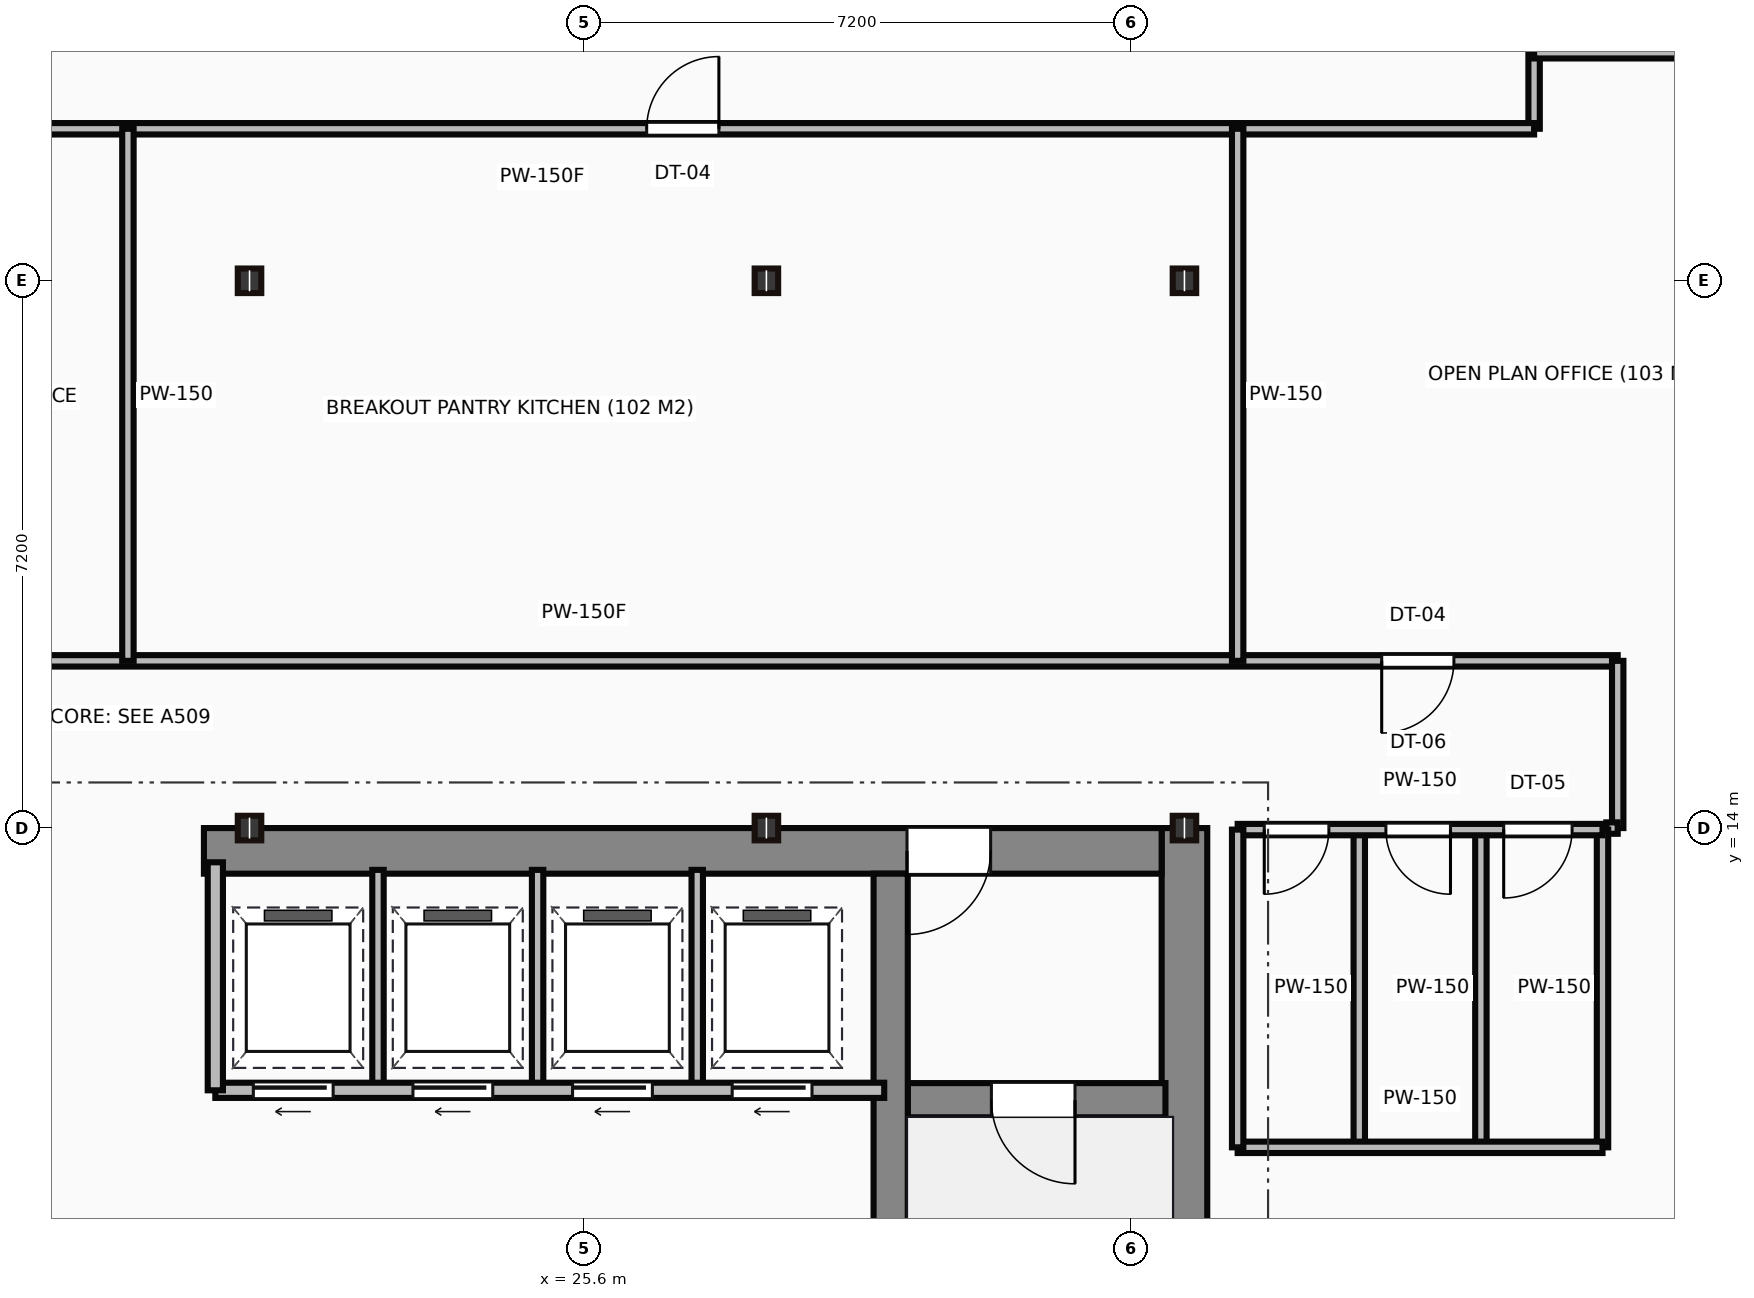
"""IFC4 building model, lengths in metres.
Left out: names, types, materials, properties, quantities, classifications, styles, units other than length and angle.
Written with IfcOpenShell. Run it as: python <this file> out.ifc"""

import sys

from ifc_helpers import new_model, si_unit, direction, frame, frame_2d, origin, origin_2d, place, context, subcontext, project, spatial, rectangle, i_section, extrude, source, transform, mapped, element, fill, save


model = new_model("IFC4")
c1 = context("Model", 3, precision=1e-05, world=origin(), true_north=direction((0.0, 1.0)))
c2 = subcontext(c1, "Body", "Model", "MODEL_VIEW")
j1 = project(units=[si_unit("LENGTHUNIT", "METRE"), si_unit("PLANEANGLEUNIT", "RADIAN")], contexts=[c1])
p1 = place(None, origin())
s1 = spatial("IfcSite", under=j1, at=p1, CompositionType="ELEMENT")
p2 = place(p1, origin())
s2 = spatial("IfcBuilding", under=s1, at=p2, CompositionType="ELEMENT")
p3 = place(p2, frame((0.0, 0.0, 210.5)))
s3 = spatial("IfcBuildingStorey", under=s2, at=p3, CompositionType="ELEMENT", Elevation=210.5)
m1 = source(origin(), c2, "Body", "SweptSolid", [
    extrude(rectangle(XDim=13.1, YDim=0.6, at=frame_2d((6.55, 0.0))), origin(), (0.0, 0.0, 1.0), 3.65),
])
p4 = place(p3, frame((33.5, 0.9, 0.0), z_axis=(0.0, 0.0, 1.0), x_axis=(0.0, 1.0, 0.0)))
e1 = element("IfcWall", 1, at=p4, inside=s3, PredefinedType="SHEAR", context=c2, shape_type="MappedRepresentation", body=[
    mapped(m1, transform((0.0, 0.0, 0.0))),
])
m2 = source(origin(), c2, "Body", "SweptSolid", [
    extrude(rectangle(XDim=12.6, YDim=0.6, at=frame_2d((6.3, 0.0))), origin(), (0.0, 0.0, 1.0), 3.65),
])
p5 = place(p3, frame((20.6, 13.7, 0.0), z_axis=(0.0, 0.0, 1.0), x_axis=(1.0, 0.0, 0.0)))
e2 = element("IfcWall", 2, at=p5, inside=s3, PredefinedType="SHEAR", context=c2, shape_type="MappedRepresentation", body=[
    mapped(m2, transform((0.0, 0.0, 0.0))),
])
p6 = place(p5, frame((9.25, 0.0, 0.0)))
e3 = element("IfcOpeningElement", 3, at=p6, cuts=e2, PredefinedType="OPENING", context=c2, shape_type="SweptSolid", body=[
    extrude(rectangle(XDim=1.1, YDim=2.15, at=frame_2d((0.55, 1.075))), frame((0.0, 0.31, 0.0), z_axis=(0.0, -1.0, 0.0), x_axis=(1.0, 0.0, 0.0)), (0.0, 0.0, 1.0), 0.62),
])
m3 = source(origin(), c2, "Body", "SweptSolid", [
    extrude(rectangle(XDim=12.5, YDim=0.45, at=frame_2d((6.25, 0.0))), origin(), (0.0, 0.0, 1.0), 3.65),
])
p7 = place(p3, frame((29.635, 0.9, 0.0), z_axis=(0.0, 0.0, 1.0), x_axis=(0.0, 1.0, 0.0)))
e4 = element("IfcWall", 4, at=p7, inside=s3, PredefinedType="SHEAR", context=c2, shape_type="MappedRepresentation", body=[
    mapped(m3, transform((0.0, 0.0, 0.0))),
])
m4 = source(origin(), c2, "Body", "SweptSolid", [
    extrude(rectangle(XDim=3.39, YDim=0.45, at=frame_2d((1.695, 0.0))), origin(), (0.0, 0.0, 1.0), 3.65),
])
p8 = place(p3, frame((29.86, 10.42, 0.0), z_axis=(0.0, 0.0, 1.0), x_axis=(1.0, 0.0, 0.0)))
e5 = element("IfcWall", 5, at=p8, inside=s3, PredefinedType="SHEAR", context=c2, shape_type="MappedRepresentation", body=[
    mapped(m4, transform((0.0, 0.0, 0.0))),
])
p9 = place(p8, frame((1.1, 0.0, 0.0)))
e6 = element("IfcOpeningElement", 6, at=p9, cuts=e5, PredefinedType="OPENING", context=c2, shape_type="SweptSolid", body=[
    extrude(rectangle(XDim=1.1, YDim=2.15, at=frame_2d((0.55, 1.075))), frame((0.0, 0.235, 0.0), z_axis=(0.0, -1.0, 0.0), x_axis=(1.0, 0.0, 0.0)), (0.0, 0.0, 1.0), 0.47),
])
m5 = source(origin(), c2, "Body", "SweptSolid", [
    extrude(i_section(OverallWidth=0.309, OverallDepth=0.323, WebThickness=0.014, FlangeThickness=0.023, at=origin_2d()), origin(), (0.0, 0.0, 1.0), 3.65),
])
for number, where, z_axis, x_axis in (
    (7, (21.2, 14.0, 0.0), (0.0, 0.0, 1.0), (1.0, 0.0, 0.0)),
    (8, (21.2, 21.2, 0.0), (0.0, 0.0, 1.0), (1.0, 0.0, 0.0)),
    (9, (28.0, 14.0, 0.0), (0.0, 0.0, 1.0), (1.0, 0.0, 0.0)),
    (10, (28.0, 21.2, 0.0), (0.0, 0.0, 1.0), (1.0, 0.0, 0.0)),
    (11, (33.5, 14.0, 0.0), (0.0, 0.0, 1.0), (1.0, 0.0, 0.0)),
    (12, (33.5, 21.2, 0.0), (0.0, 0.0, 1.0), (1.0, 0.0, 0.0)),
):
    element("IfcColumn", number, at=place(p3, frame(where, z_axis=z_axis, x_axis=x_axis)), inside=s3, PredefinedType="COLUMN", context=c2, shape_type="MappedRepresentation", body=[
        mapped(m5, transform((0.0, 0.0, 0.0))),
    ])
m6 = source(origin(), c2, "Body", "SweptSolid", [
    extrude(rectangle(XDim=8.8, YDim=0.2, at=frame_2d((4.4, 0.0))), origin(), (0.0, 0.0, 1.0), 3.4),
])
p10 = place(p3, frame((20.75, 10.55, 0.0), z_axis=(0.0, 0.0, 1.0), x_axis=(1.0, 0.0, 0.0)))
e13 = element("IfcWall", 13, at=p10, inside=s3, PredefinedType="PARTITIONING", context=c2, shape_type="MappedRepresentation", body=[
    mapped(m6, transform((0.0, 0.0, 0.0))),
])
p11 = place(p10, frame((0.5, 0.0, 0.0)))
e14 = element("IfcOpeningElement", 14, at=p11, cuts=e13, PredefinedType="OPENING", context=c2, shape_type="SweptSolid", body=[
    extrude(rectangle(XDim=1.05, YDim=2.15, at=frame_2d((0.525, 1.075))), frame((0.0, 0.11, 0.0), z_axis=(0.0, -1.0, 0.0), x_axis=(1.0, 0.0, 0.0)), (0.0, 0.0, 1.0), 0.22),
])
p12 = place(p10, frame((2.6, 0.0, 0.0)))
e15 = element("IfcOpeningElement", 15, at=p12, cuts=e13, PredefinedType="OPENING", context=c2, shape_type="SweptSolid", body=[
    extrude(rectangle(XDim=1.05, YDim=2.15, at=frame_2d((0.525, 1.075))), frame((0.0, 0.11, 0.0), z_axis=(0.0, -1.0, 0.0), x_axis=(1.0, 0.0, 0.0)), (0.0, 0.0, 1.0), 0.22),
])
p13 = place(p10, frame((4.7, 0.0, 0.0)))
e16 = element("IfcOpeningElement", 16, at=p13, cuts=e13, PredefinedType="OPENING", context=c2, shape_type="SweptSolid", body=[
    extrude(rectangle(XDim=1.05, YDim=2.15, at=frame_2d((0.525, 1.075))), frame((0.0, 0.11, 0.0), z_axis=(0.0, -1.0, 0.0), x_axis=(1.0, 0.0, 0.0)), (0.0, 0.0, 1.0), 0.22),
])
p14 = place(p10, frame((6.8, 0.0, 0.0)))
e17 = element("IfcOpeningElement", 17, at=p14, cuts=e13, PredefinedType="OPENING", context=c2, shape_type="SweptSolid", body=[
    extrude(rectangle(XDim=1.05, YDim=2.15, at=frame_2d((0.525, 1.075))), frame((0.0, 0.11, 0.0), z_axis=(0.0, -1.0, 0.0), x_axis=(1.0, 0.0, 0.0)), (0.0, 0.0, 1.0), 0.22),
])
m7 = source(origin(), c2, "Body", "SweptSolid", [
    extrude(rectangle(XDim=3.0, YDim=0.2, at=frame_2d((1.5, 0.0))), origin(), (0.0, 0.0, 1.0), 3.4),
])
p15 = place(p3, frame((20.75, 10.55, 0.0), z_axis=(0.0, 0.0, 1.0), x_axis=(0.0, 1.0, 0.0)))
e18 = element("IfcWall", 18, at=p15, inside=s3, PredefinedType="PARTITIONING", context=c2, shape_type="MappedRepresentation", body=[
    mapped(m7, transform((0.0, 0.0, 0.0))),
])
m8 = source(origin(), c2, "Body", "SweptSolid", [
    extrude(rectangle(XDim=2.85, YDim=0.15, at=frame_2d((1.425, 0.0))), origin(), (0.0, 0.0, 1.0), 3.4),
])
for number, where, z_axis, x_axis in (
    (19, (22.89, 10.6, 0.0), (0.0, 0.0, 1.0), (0.0, 1.0, 0.0)),
    (20, (24.99, 10.6, 0.0), (0.0, 0.0, 1.0), (0.0, 1.0, 0.0)),
    (21, (27.09, 10.6, 0.0), (0.0, 0.0, 1.0), (0.0, 1.0, 0.0)),
):
    element("IfcWall", number, at=place(p3, frame(where, z_axis=z_axis, x_axis=x_axis)), inside=s3, PredefinedType="PARTITIONING", context=c2, shape_type="MappedRepresentation", body=[
        mapped(m8, transform((0.0, 0.0, 0.0))),
    ])
m9 = source(origin(), c2, "Body", "SweptSolid", [
    extrude(rectangle(XDim=4.8, YDim=0.15, at=frame_2d((2.4, 0.0))), origin(), (0.0, 0.0, 1.0), 2.787),
])
p16 = place(p3, frame((34.2, 13.98, 0.0), z_axis=(0.0, 0.0, 1.0), x_axis=(1.0, 0.0, 0.0)))
e22 = element("IfcWall", 22, at=p16, inside=s3, PredefinedType="PARTITIONING", context=c2, shape_type="MappedRepresentation", body=[
    mapped(m9, transform((0.0, 0.0, 0.0))),
])
p17 = place(p16, frame((0.35, 0.0, 0.0)))
e23 = element("IfcOpeningElement", 23, at=p17, cuts=e22, PredefinedType="OPENING", context=c2, shape_type="SweptSolid", body=[
    extrude(rectangle(XDim=0.85, YDim=2.1, at=frame_2d((0.425, 1.05))), frame((0.0, 0.085, 0.0), z_axis=(0.0, -1.0, 0.0), x_axis=(1.0, 0.0, 0.0)), (0.0, 0.0, 1.0), 0.17),
])
p18 = place(p16, frame((1.95, 0.0, 0.0)))
e24 = element("IfcOpeningElement", 24, at=p18, cuts=e22, PredefinedType="OPENING", context=c2, shape_type="SweptSolid", body=[
    extrude(rectangle(XDim=0.85, YDim=2.1, at=frame_2d((0.425, 1.05))), frame((0.0, 0.085, 0.0), z_axis=(0.0, -1.0, 0.0), x_axis=(1.0, 0.0, 0.0)), (0.0, 0.0, 1.0), 0.17),
])
p19 = place(p16, frame((3.5, 0.0, 0.0)))
e25 = element("IfcOpeningElement", 25, at=p19, cuts=e22, PredefinedType="OPENING", context=c2, shape_type="SweptSolid", body=[
    extrude(rectangle(XDim=0.9, YDim=2.1, at=frame_2d((0.45, 1.05))), frame((0.0, 0.085, 0.0), z_axis=(0.0, -1.0, 0.0), x_axis=(1.0, 0.0, 0.0)), (0.0, 0.0, 1.0), 0.17),
])
m10 = source(origin(), c2, "Body", "SweptSolid", [
    extrude(rectangle(XDim=4.8, YDim=0.15, at=frame_2d((2.4, 0.0))), origin(), (0.0, 0.0, 1.0), 3.4),
])
p20 = place(p3, frame((34.2, 9.8, 0.0), z_axis=(0.0, 0.0, 1.0), x_axis=(1.0, 0.0, 0.0)))
e26 = element("IfcWall", 26, at=p20, inside=s3, PredefinedType="PARTITIONING", context=c2, shape_type="MappedRepresentation", body=[
    mapped(m10, transform((0.0, 0.0, 0.0))),
])
m11 = source(origin(), c2, "Body", "SweptSolid", [
    extrude(rectangle(XDim=4.18, YDim=0.15, at=frame_2d((2.09, 0.0))), origin(), (0.0, 0.0, 1.0), 3.4),
])
for number, where, z_axis, x_axis in (
    (27, (39.0, 9.8, 0.0), (0.0, 0.0, 1.0), (0.0, 1.0, 0.0)),
    (28, (34.2, 9.8, 0.0), (0.0, 0.0, 1.0), (0.0, 1.0, 0.0)),
    (29, (35.8, 9.8, 0.0), (0.0, 0.0, 1.0), (0.0, 1.0, 0.0)),
    (30, (37.4, 9.8, 0.0), (0.0, 0.0, 1.0), (0.0, 1.0, 0.0)),
):
    element("IfcWall", number, at=place(p3, frame(where, z_axis=z_axis, x_axis=x_axis)), inside=s3, PredefinedType="PARTITIONING", context=c2, shape_type="MappedRepresentation", body=[
        mapped(m11, transform((0.0, 0.0, 0.0))),
    ])
m12 = source(origin(), c2, "Body", "SweptSolid", [
    extrude(rectangle(XDim=2.05, YDim=0.15, at=frame_2d((1.025, 0.0))), origin(), (0.0, 0.0, 1.0), 3.4),
])
p21 = place(p3, frame((38.1, 25.25, 0.0), z_axis=(0.0, 0.0, 1.0), x_axis=(0.0, -1.0, 0.0)))
e31 = element("IfcWall", 31, at=p21, inside=s3, PredefinedType="PARTITIONING", context=c2, shape_type="MappedRepresentation", body=[
    mapped(m12, transform((0.0, 0.0, 0.0))),
])
m13 = source(origin(), c2, "Body", "SweptSolid", [
    extrude(rectangle(XDim=26.1, YDim=0.15, at=frame_2d((13.05, 0.0))), origin(), (0.0, 0.0, 1.0), 3.4),
])
p22 = place(p3, frame((38.1, 23.2, 0.0), z_axis=(0.0, 0.0, 1.0), x_axis=(-1.0, 0.0, 0.0)))
e32 = element("IfcWall", 32, at=p22, inside=s3, PredefinedType="PARTITIONING", context=c2, shape_type="MappedRepresentation", body=[
    mapped(m13, transform((0.0, 0.0, 0.0))),
])
p23 = place(p22, frame((10.725, 0.0, 0.0)))
e33 = element("IfcOpeningElement", 33, at=p23, cuts=e32, PredefinedType="OPENING", context=c2, shape_type="SweptSolid", body=[
    extrude(rectangle(XDim=0.95, YDim=2.15, at=frame_2d((0.475, 1.075))), frame((0.0, 0.085, 0.0), z_axis=(0.0, -1.0, 0.0), x_axis=(1.0, 0.0, 0.0)), (0.0, 0.0, 1.0), 0.17),
])
m14 = source(origin(), c2, "Body", "SweptSolid", [
    extrude(rectangle(XDim=27.2, YDim=0.15, at=frame_2d((13.6, 0.0))), origin(), (0.0, 0.0, 1.0), 3.4),
])
p24 = place(p3, frame((12.0, 16.2, 0.0), z_axis=(0.0, 0.0, 1.0), x_axis=(1.0, 0.0, 0.0)))
e34 = element("IfcWall", 34, at=p24, inside=s3, PredefinedType="PARTITIONING", context=c2, shape_type="MappedRepresentation", body=[
    mapped(m14, transform((0.0, 0.0, 0.0))),
])
p25 = place(p24, frame((3.455, 0.0, 0.0)))
e35 = element("IfcOpeningElement", 35, at=p25, cuts=e34, PredefinedType="OPENING", context=c2, shape_type="SweptSolid", body=[
    extrude(rectangle(XDim=0.95, YDim=2.15, at=frame_2d((0.475, 1.075))), frame((0.0, 0.085, 0.0), z_axis=(0.0, -1.0, 0.0), x_axis=(1.0, 0.0, 0.0)), (0.0, 0.0, 1.0), 0.17),
])
p26 = place(p24, frame((24.095, 0.0, 0.0)))
e36 = element("IfcOpeningElement", 36, at=p26, cuts=e34, PredefinedType="OPENING", context=c2, shape_type="SweptSolid", body=[
    extrude(rectangle(XDim=0.95, YDim=2.15, at=frame_2d((0.475, 1.075))), frame((0.0, 0.085, 0.0), z_axis=(0.0, -1.0, 0.0), x_axis=(1.0, 0.0, 0.0)), (0.0, 0.0, 1.0), 0.17),
])
m15 = source(origin(), c2, "Body", "SweptSolid", [
    extrude(rectangle(XDim=2.2, YDim=0.15, at=frame_2d((1.1, 0.0))), origin(), (0.0, 0.0, 1.0), 3.4),
])
p27 = place(p3, frame((39.2, 16.2, 0.0), z_axis=(0.0, 0.0, 1.0), x_axis=(0.0, -1.0, 0.0)))
e37 = element("IfcWall", 37, at=p27, inside=s3, PredefinedType="PARTITIONING", context=c2, shape_type="MappedRepresentation", body=[
    mapped(m15, transform((0.0, 0.0, 0.0))),
])
m16 = source(origin(), c2, "Body", "SweptSolid", [
    extrude(rectangle(XDim=0.15, YDim=0.15, at=frame_2d((0.075, 0.0))), origin(), (0.0, 0.0, 1.0), 3.4),
])
p28 = place(p3, frame((39.2, 14.0, 0.0), z_axis=(0.0, 0.0, 1.0), x_axis=(-1.0, 0.0, 0.0)))
e38 = element("IfcWall", 38, at=p28, inside=s3, PredefinedType="PARTITIONING", context=c2, shape_type="MappedRepresentation", body=[
    mapped(m16, transform((0.0, 0.0, 0.0))),
])
m17 = source(origin(), c2, "Body", "SweptSolid", [
    extrude(rectangle(XDim=7.0, YDim=0.15, at=frame_2d((3.5, 0.0))), origin(), (0.0, 0.0, 1.0), 3.4),
])
for number, where, z_axis, x_axis in (
    (39, (19.6, 23.2, 0.0), (0.0, 0.0, 1.0), (0.0, -1.0, 0.0)),
    (40, (34.2, 23.2, 0.0), (0.0, 0.0, 1.0), (0.0, -1.0, 0.0)),
):
    element("IfcWall", number, at=place(p3, frame(where, z_axis=z_axis, x_axis=x_axis)), inside=s3, PredefinedType="PARTITIONING", context=c2, shape_type="MappedRepresentation", body=[
        mapped(m17, transform((0.0, 0.0, 0.0))),
    ])
m18 = source(origin(), c2, "Body", "SweptSolid", [
    extrude(rectangle(XDim=4.88, YDim=0.15, at=frame_2d((2.44, 0.0))), origin(), (0.0, 0.0, 1.0), 3.4),
])
p29 = place(p3, frame((42.98, 24.2, 0.0), z_axis=(0.0, 0.0, 1.0), x_axis=(-1.0, 0.0, 0.0)))
e41 = element("IfcWall", 41, at=p29, inside=s3, PredefinedType="PARTITIONING", context=c2, shape_type="MappedRepresentation", body=[
    mapped(m18, transform((0.0, 0.0, 0.0))),
])
m19 = source(origin(), c2, "Body", "SweptSolid", [
    extrude(rectangle(XDim=1.1, YDim=2.15, at=frame_2d((0.55, 1.075))), frame((0.0, 0.025, 0.0), z_axis=(0.0, -1.0, 0.0), x_axis=(1.0, 0.0, 0.0)), (0.0, 0.0, 1.0), 0.05),
])
p30 = place(p9, frame((1.1, 0.0, 0.0), z_axis=(0.0, 0.0, 1.0), x_axis=(-1.0, 0.0, 0.0)))
e42 = element("IfcDoor", 42, at=p30, inside=s3, OperationType="SINGLE_SWING_RIGHT", PredefinedType="DOOR", context=c2, shape_type="MappedRepresentation", body=[
    mapped(m19, transform((0.0, 0.0, 0.0))),
])
fill(e6, e42)
p31 = place(p6, origin())
e43 = element("IfcDoor", 43, at=p31, inside=s3, OperationType="SINGLE_SWING_LEFT", PredefinedType="DOOR", context=c2, shape_type="MappedRepresentation", body=[
    mapped(m19, transform((0.0, 0.0, 0.0))),
])
fill(e3, e43)
m20 = source(origin(), c2, "Body", "SweptSolid", [
    extrude(rectangle(XDim=1.05, YDim=2.15, at=frame_2d((0.525, 1.075))), frame((0.0, 0.025, 0.0), z_axis=(0.0, -1.0, 0.0), x_axis=(1.0, 0.0, 0.0)), (0.0, 0.0, 1.0), 0.05),
])
p32 = place(p11, frame((1.05, 0.0, 0.0), z_axis=(0.0, 0.0, 1.0), x_axis=(-1.0, 0.0, 0.0)))
e44 = element("IfcDoor", 44, at=p32, inside=s3, OperationType="SLIDING_TO_LEFT", PredefinedType="DOOR", context=c2, shape_type="MappedRepresentation", body=[
    mapped(m20, transform((0.0, 0.0, 0.0))),
])
fill(e14, e44)
p33 = place(p12, frame((1.05, 0.0, 0.0), z_axis=(0.0, 0.0, 1.0), x_axis=(-1.0, 0.0, 0.0)))
e45 = element("IfcDoor", 45, at=p33, inside=s3, OperationType="SLIDING_TO_LEFT", PredefinedType="DOOR", context=c2, shape_type="MappedRepresentation", body=[
    mapped(m20, transform((0.0, 0.0, 0.0))),
])
fill(e15, e45)
p34 = place(p13, frame((1.05, 0.0, 0.0), z_axis=(0.0, 0.0, 1.0), x_axis=(-1.0, 0.0, 0.0)))
e46 = element("IfcDoor", 46, at=p34, inside=s3, OperationType="SLIDING_TO_LEFT", PredefinedType="DOOR", context=c2, shape_type="MappedRepresentation", body=[
    mapped(m20, transform((0.0, 0.0, 0.0))),
])
fill(e16, e46)
p35 = place(p14, frame((1.05, 0.0, 0.0), z_axis=(0.0, 0.0, 1.0), x_axis=(-1.0, 0.0, 0.0)))
e47 = element("IfcDoor", 47, at=p35, inside=s3, OperationType="SLIDING_TO_LEFT", PredefinedType="DOOR", context=c2, shape_type="MappedRepresentation", body=[
    mapped(m20, transform((0.0, 0.0, 0.0))),
])
fill(e17, e47)
m21 = source(origin(), c2, "Body", "SweptSolid", [
    extrude(rectangle(XDim=0.85, YDim=2.1, at=frame_2d((0.425, 1.05))), frame((0.0, 0.025, 0.0), z_axis=(0.0, -1.0, 0.0), x_axis=(1.0, 0.0, 0.0)), (0.0, 0.0, 1.0), 0.05),
])
p36 = place(p17, frame((0.85, 0.0, 0.0), z_axis=(0.0, 0.0, 1.0), x_axis=(-1.0, 0.0, 0.0)))
e48 = element("IfcDoor", 48, at=p36, inside=s3, OperationType="SINGLE_SWING_LEFT", PredefinedType="DOOR", context=c2, shape_type="MappedRepresentation", body=[
    mapped(m21, transform((0.0, 0.0, 0.0))),
])
fill(e23, e48)
p37 = place(p18, frame((0.85, 0.0, 0.0), z_axis=(0.0, 0.0, 1.0), x_axis=(-1.0, 0.0, 0.0)))
e49 = element("IfcDoor", 49, at=p37, inside=s3, OperationType="SINGLE_SWING_RIGHT", PredefinedType="DOOR", context=c2, shape_type="MappedRepresentation", body=[
    mapped(m21, transform((0.0, 0.0, 0.0))),
])
fill(e24, e49)
m22 = source(origin(), c2, "Body", "SweptSolid", [
    extrude(rectangle(XDim=0.9, YDim=2.1, at=frame_2d((0.45, 1.05))), frame((0.0, 0.025, 0.0), z_axis=(0.0, -1.0, 0.0), x_axis=(1.0, 0.0, 0.0)), (0.0, 0.0, 1.0), 0.05),
])
p38 = place(p19, frame((0.9, 0.0, 0.0), z_axis=(0.0, 0.0, 1.0), x_axis=(-1.0, 0.0, 0.0)))
e50 = element("IfcDoor", 50, at=p38, inside=s3, OperationType="SINGLE_SWING_LEFT", PredefinedType="DOOR", context=c2, shape_type="MappedRepresentation", body=[
    mapped(m22, transform((0.0, 0.0, 0.0))),
])
fill(e25, e50)
m23 = source(origin(), c2, "Body", "SweptSolid", [
    extrude(rectangle(XDim=0.95, YDim=2.15, at=frame_2d((0.475, 1.075))), frame((0.0, 0.025, 0.0), z_axis=(0.0, -1.0, 0.0), x_axis=(1.0, 0.0, 0.0)), (0.0, 0.0, 1.0), 0.05),
])
p39 = place(p23, origin())
e51 = element("IfcDoor", 51, at=p39, inside=s3, OperationType="SINGLE_SWING_LEFT", PredefinedType="DOOR", context=c2, shape_type="MappedRepresentation", body=[
    mapped(m23, transform((0.0, 0.0, 0.0))),
])
fill(e33, e51)
p40 = place(p26, origin())
e52 = element("IfcDoor", 52, at=p40, inside=s3, OperationType="SINGLE_SWING_LEFT", PredefinedType="DOOR", context=c2, shape_type="MappedRepresentation", body=[
    mapped(m23, transform((0.0, 0.0, 0.0))),
])
fill(e36, e52)
save(model, sys.argv[1])
